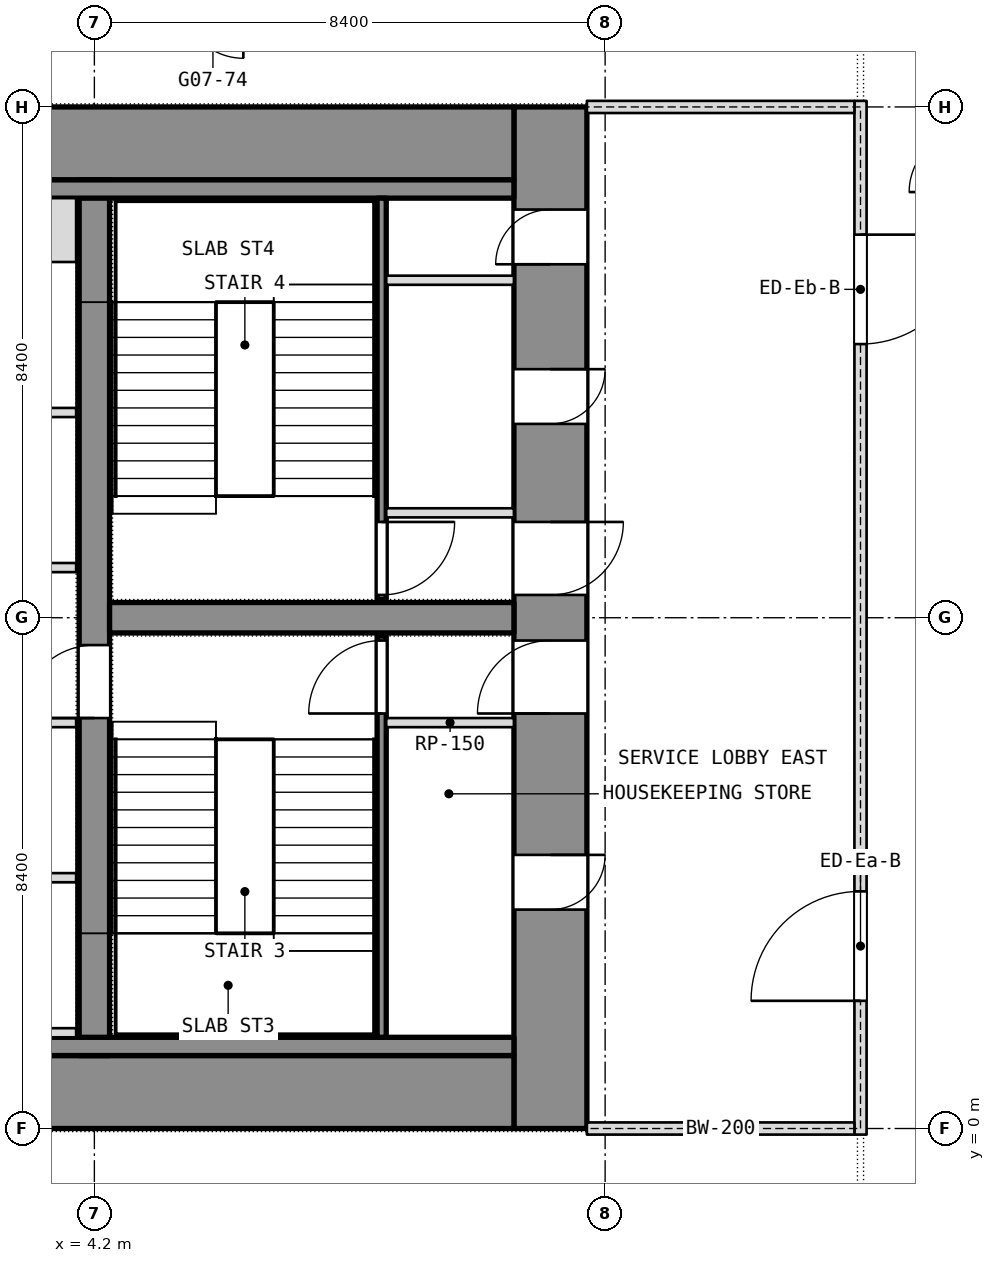
"""IFC4 building model, lengths in metres.
Left out: names, types, materials, properties, quantities, classifications, styles, units other than length and angle.
Written with IfcOpenShell. Run it as: python <this file> out.ifc"""

import sys

from ifc_helpers import new_model, si_unit, direction, frame, frame_2d, origin, place, context, subcontext, project, spatial, rectangle, extrude, element, fill, save


model = new_model("IFC4")
c1 = context("Model", 3, precision=1e-05, world=origin(), true_north=direction((0.0, 1.0)))
c2 = subcontext(c1, "Body", "Model", "MODEL_VIEW")
j1 = project(units=[si_unit("LENGTHUNIT", "METRE"), si_unit("PLANEANGLEUNIT", "RADIAN")], contexts=[c1])
p1 = place(None, origin())
s1 = spatial("IfcSite", under=j1, at=p1, CompositionType="ELEMENT")
p2 = place(p1, origin())
s2 = spatial("IfcBuilding", under=s1, at=p2, CompositionType="ELEMENT")
p3 = place(p2, frame((0.0, 0.0, 79.7)))
s3 = spatial("IfcBuildingStorey", under=s2, at=p3, CompositionType="ELEMENT", Elevation=79.7)
p4 = place(p3, frame((11.7, 0.0, 0.0), z_axis=(0.0, 0.0, 1.0), x_axis=(0.0, 1.0, 0.0)))
e1 = element("IfcWall", 1, at=p4, inside=s3, PredefinedType="SHEAR", context=c2, shape_type="SweptSolid", body=[
    extrude(rectangle(XDim=16.8, YDim=1.2, at=frame_2d((8.4, 0.0))), origin(), (0.0, 0.0, 1.0), 3.6),
])
p5 = place(p4, frame((3.6, 0.0, 0.0)))
e2 = element("IfcOpeningElement", 2, at=p5, cuts=e1, PredefinedType="OPENING", context=c2, shape_type="SweptSolid", body=[
    extrude(rectangle(XDim=0.9, YDim=2.1, at=frame_2d((0.45, 1.05))), frame((0.0, 0.6, 0.0), z_axis=(0.0, -1.0, 0.0), x_axis=(1.0, 0.0, 0.0)), (0.0, 0.0, 1.0), 1.2),
])
p6 = place(p4, frame((6.825, 0.0, 0.0)))
e3 = element("IfcOpeningElement", 3, at=p6, cuts=e1, PredefinedType="OPENING", context=c2, shape_type="SweptSolid", body=[
    extrude(rectangle(XDim=1.2, YDim=2.1, at=frame_2d((0.6, 1.05))), frame((0.0, 0.6, 0.0), z_axis=(0.0, -1.0, 0.0), x_axis=(1.0, 0.0, 0.0)), (0.0, 0.0, 1.0), 1.2),
])
p7 = place(p4, frame((14.212, 0.0, 0.0)))
e4 = element("IfcOpeningElement", 4, at=p7, cuts=e1, PredefinedType="OPENING", context=c2, shape_type="SweptSolid", body=[
    extrude(rectangle(XDim=0.9, YDim=2.1, at=frame_2d((0.45, 1.05))), frame((0.0, 0.6, 0.0), z_axis=(0.0, -1.0, 0.0), x_axis=(1.0, 0.0, 0.0)), (0.0, 0.0, 1.0), 1.2),
])
p8 = place(p4, frame((11.587, 0.0, 0.0)))
e5 = element("IfcOpeningElement", 5, at=p8, cuts=e1, PredefinedType="OPENING", context=c2, shape_type="SweptSolid", body=[
    extrude(rectangle(XDim=0.9, YDim=2.1, at=frame_2d((0.45, 1.05))), frame((0.0, 0.6, 0.0), z_axis=(0.0, -1.0, 0.0), x_axis=(1.0, 0.0, 0.0)), (0.0, 0.0, 1.0), 1.2),
])
p9 = place(p4, frame((8.775, 0.0, 0.0)))
e6 = element("IfcOpeningElement", 6, at=p9, cuts=e1, PredefinedType="OPENING", context=c2, shape_type="SweptSolid", body=[
    extrude(rectangle(XDim=1.2, YDim=2.1, at=frame_2d((0.6, 1.05))), frame((0.0, 0.6, 0.0), z_axis=(0.0, -1.0, 0.0), x_axis=(1.0, 0.0, 0.0)), (0.0, 0.0, 1.0), 1.2),
])
for number, where, z_axis, x_axis in (
    (7, (-11.1, 0.6, 0.0), (0.0, 0.0, 1.0), (1.0, 0.0, 0.0)),
    (8, (-11.1, 16.2, 0.0), (0.0, 0.0, 1.0), (1.0, 0.0, 0.0)),
):
    element("IfcWall", number, at=place(p3, frame(where, z_axis=z_axis, x_axis=x_axis)), inside=s3, PredefinedType="SHEAR", context=c2, shape_type="SweptSolid", body=[
        extrude(rectangle(XDim=22.2, YDim=1.2, at=frame_2d((11.1, 0.0))), origin(), (0.0, 0.0, 1.0), 3.6),
    ])
p10 = place(p3, frame((4.2, 1.2, 0.0), z_axis=(0.0, 0.0, 1.0), x_axis=(0.0, 1.0, 0.0)))
e9 = element("IfcWall", 9, at=p10, inside=s3, PredefinedType="SHEAR", context=c2, shape_type="SweptSolid", body=[
    extrude(rectangle(XDim=14.4, YDim=0.5, at=frame_2d((7.2, 0.0))), origin(), (0.0, 0.0, 1.0), 3.6),
])
p11 = place(p10, frame((5.55, 0.0, 0.0)))
e10 = element("IfcOpeningElement", 10, at=p11, cuts=e9, PredefinedType="OPENING", context=c2, shape_type="SweptSolid", body=[
    extrude(rectangle(XDim=1.2, YDim=2.1, at=frame_2d((0.6, 1.05))), frame((0.0, 0.25, 0.0), z_axis=(0.0, -1.0, 0.0), x_axis=(1.0, 0.0, 0.0)), (0.0, 0.0, 1.0), 0.5),
])
p12 = place(p3, frame((4.45, 8.4, 0.0), z_axis=(0.0, 0.0, 1.0), x_axis=(1.0, 0.0, 0.0)))
e11 = element("IfcWall", 11, at=p12, inside=s3, PredefinedType="SHEAR", context=c2, shape_type="SweptSolid", body=[
    extrude(rectangle(XDim=6.65, YDim=0.5, at=frame_2d((3.325, 0.0))), origin(), (0.0, 0.0, 1.0), 3.6),
])
for number, where, z_axis, x_axis in (
    (12, (-11.1, 1.35, 0.0), (0.0, 0.0, 1.0), (1.0, 0.0, 0.0)),
    (13, (-11.1, 15.45, 0.0), (0.0, 0.0, 1.0), (1.0, 0.0, 0.0)),
):
    element("IfcWall", number, at=place(p3, frame(where, z_axis=z_axis, x_axis=x_axis)), inside=s3, PredefinedType="PARTITIONING", context=c2, shape_type="SweptSolid", body=[
        extrude(rectangle(XDim=22.2, YDim=0.3, at=frame_2d((11.1, 0.0))), origin(), (0.0, 0.0, 1.0), 3.34),
    ])
p13 = place(p3, frame((8.925, 1.5, 0.0), z_axis=(0.0, 0.0, 1.0), x_axis=(0.0, 1.0, 0.0)))
e14 = element("IfcWall", 14, at=p13, inside=s3, PredefinedType="SHEAR", context=c2, shape_type="SweptSolid", body=[
    extrude(rectangle(XDim=6.6, YDim=0.15, at=frame_2d((3.3, 0.0))), origin(), (0.0, 0.0, 1.0), 3.34),
])
p14 = place(p13, frame((5.325, 0.0, 0.0)))
e15 = element("IfcOpeningElement", 15, at=p14, cuts=e14, PredefinedType="OPENING", context=c2, shape_type="SweptSolid", body=[
    extrude(rectangle(XDim=1.2, YDim=2.1, at=frame_2d((0.6, 1.05))), frame((0.0, 0.075, 0.0), z_axis=(0.0, -1.0, 0.0), x_axis=(1.0, 0.0, 0.0)), (0.0, 0.0, 1.0), 0.15),
])
p15 = place(p3, frame((9.0, 6.675, 0.0), z_axis=(0.0, 0.0, 1.0), x_axis=(1.0, 0.0, 0.0)))
e16 = element("IfcWall", 16, at=p15, inside=s3, PredefinedType="PARTITIONING", context=c2, shape_type="SweptSolid", body=[
    extrude(rectangle(XDim=2.1, YDim=0.15, at=frame_2d((1.05, 0.0))), origin(), (0.0, 0.0, 1.0), 3.34),
])
p16 = place(p3, frame((8.925, 8.7, 0.0), z_axis=(0.0, 0.0, 1.0), x_axis=(0.0, 1.0, 0.0)))
e17 = element("IfcWall", 17, at=p16, inside=s3, PredefinedType="SHEAR", context=c2, shape_type="SweptSolid", body=[
    extrude(rectangle(XDim=6.6, YDim=0.15, at=frame_2d((3.3, 0.0))), origin(), (0.0, 0.0, 1.0), 3.34),
])
p17 = place(p16, frame((0.075, 0.0, 0.0)))
e18 = element("IfcOpeningElement", 18, at=p17, cuts=e17, PredefinedType="OPENING", context=c2, shape_type="SweptSolid", body=[
    extrude(rectangle(XDim=1.2, YDim=2.1, at=frame_2d((0.6, 1.05))), frame((0.0, 0.075, 0.0), z_axis=(0.0, -1.0, 0.0), x_axis=(1.0, 0.0, 0.0)), (0.0, 0.0, 1.0), 0.15),
])
for number, where, z_axis, x_axis in (
    (19, (9.0, 10.125, 0.0), (0.0, 0.0, 1.0), (1.0, 0.0, 0.0)),
    (20, (9.0, 13.95, 0.0), (0.0, 0.0, 1.0), (1.0, 0.0, 0.0)),
):
    element("IfcWall", number, at=place(p3, frame(where, z_axis=z_axis, x_axis=x_axis)), inside=s3, PredefinedType="PARTITIONING", context=c2, shape_type="SweptSolid", body=[
        extrude(rectangle(XDim=2.1, YDim=0.15, at=frame_2d((1.05, 0.0))), origin(), (0.0, 0.0, 1.0), 3.34),
    ])
p18 = place(p3, frame((-3.9, 4.125, 0.0), z_axis=(0.0, 0.0, 1.0), x_axis=(1.0, 0.0, 0.0)))
e21 = element("IfcWall", 21, at=p18, inside=s3, PredefinedType="PARTITIONING", context=c2, shape_type="SweptSolid", body=[
    extrude(rectangle(XDim=7.8, YDim=0.15, at=frame_2d((3.9, 0.0))), origin(), (0.0, 0.0, 1.0), 3.34),
])
p19 = place(p18, frame((3.75, 0.0, 0.0)))
e22 = element("IfcOpeningElement", 22, at=p19, cuts=e21, PredefinedType="OPENING", context=c2, shape_type="SweptSolid", body=[
    extrude(rectangle(XDim=1.2, YDim=2.1, at=frame_2d((0.6, 1.05))), frame((0.0, 0.075, 0.0), z_axis=(0.0, -1.0, 0.0), x_axis=(1.0, 0.0, 0.0)), (0.0, 0.0, 1.0), 0.15),
])
p20 = place(p3, frame((-3.9, 11.775, 0.0), z_axis=(0.0, 0.0, 1.0), x_axis=(1.0, 0.0, 0.0)))
e23 = element("IfcWall", 23, at=p20, inside=s3, PredefinedType="PARTITIONING", context=c2, shape_type="SweptSolid", body=[
    extrude(rectangle(XDim=7.8, YDim=0.15, at=frame_2d((3.9, 0.0))), origin(), (0.0, 0.0, 1.0), 3.34),
])
p21 = place(p20, frame((3.3, 0.0, 0.0)))
e24 = element("IfcOpeningElement", 24, at=p21, cuts=e23, PredefinedType="OPENING", context=c2, shape_type="SweptSolid", body=[
    extrude(rectangle(XDim=1.2, YDim=2.1, at=frame_2d((0.6, 1.05))), frame((0.0, 0.075, 0.0), z_axis=(0.0, -1.0, 0.0), x_axis=(1.0, 0.0, 0.0)), (0.0, 0.0, 1.0), 0.15),
])
p22 = place(p3, frame((1.65, 1.575, 0.0), z_axis=(0.0, 0.0, 1.0), x_axis=(1.0, 0.0, 0.0)))
e25 = element("IfcWall", 25, at=p22, inside=s3, PredefinedType="SHEAR", context=c2, shape_type="SweptSolid", body=[
    extrude(rectangle(XDim=2.25, YDim=0.15, at=frame_2d((1.125, 0.0))), origin(), (0.0, 0.0, 1.0), 3.6),
])
p23 = place(p3, frame((1.65, 14.775, 0.0), z_axis=(0.0, 0.0, 1.0), x_axis=(1.0, 0.0, 0.0)))
e26 = element("IfcWall", 26, at=p23, inside=s3, PredefinedType="SHEAR", context=c2, shape_type="SweptSolid", body=[
    extrude(rectangle(XDim=2.25, YDim=1.05, at=frame_2d((1.125, 0.0))), origin(), (0.0, 0.0, 1.0), 3.6),
])
for number, where, z_axis, x_axis in (
    (27, (1.65, 6.675, 0.0), (0.0, 0.0, 1.0), (1.0, 0.0, 0.0)),
    (28, (1.65, 9.225, 0.0), (0.0, 0.0, 1.0), (1.0, 0.0, 0.0)),
):
    element("IfcWall", number, at=place(p3, frame(where, z_axis=z_axis, x_axis=x_axis)), inside=s3, PredefinedType="SHEAR", context=c2, shape_type="SweptSolid", body=[
        extrude(rectangle(XDim=2.25, YDim=0.15, at=frame_2d((1.125, 0.0))), origin(), (0.0, 0.0, 1.0), 3.6),
    ])
p24 = place(p3, frame((16.8, -0.1, 0.0), z_axis=(0.0, 0.0, 1.0), x_axis=(0.0, 1.0, 0.0)))
e29 = element("IfcWall", 29, at=p24, inside=s3, PredefinedType="PARTITIONING", context=c2, shape_type="SweptSolid", body=[
    extrude(rectangle(XDim=17.0, YDim=0.2, at=frame_2d((8.5, 0.0))), origin(), (0.0, 0.0, 1.0), 3.34),
])
p25 = place(p24, frame((2.2, 0.0, 0.0)))
e30 = element("IfcOpeningElement", 30, at=p25, cuts=e29, PredefinedType="OPENING", context=c2, shape_type="SweptSolid", body=[
    extrude(rectangle(XDim=1.8, YDim=2.1, at=frame_2d((0.9, 1.05))), frame((0.0, 0.1, 0.0), z_axis=(0.0, -1.0, 0.0), x_axis=(1.0, 0.0, 0.0)), (0.0, 0.0, 1.0), 0.2),
])
p26 = place(p24, frame((13.0, 0.0, 0.0)))
e31 = element("IfcOpeningElement", 31, at=p26, cuts=e29, PredefinedType="OPENING", context=c2, shape_type="SweptSolid", body=[
    extrude(rectangle(XDim=1.8, YDim=2.1, at=frame_2d((0.9, 1.05))), frame((0.0, 0.1, 0.0), z_axis=(0.0, -1.0, 0.0), x_axis=(1.0, 0.0, 0.0)), (0.0, 0.0, 1.0), 0.2),
])
for number, where, z_axis, x_axis in (
    (32, (12.3, 0.0, 0.0), (0.0, 0.0, 1.0), (1.0, 0.0, 0.0)),
    (33, (12.3, 16.8, 0.0), (0.0, 0.0, 1.0), (1.0, 0.0, 0.0)),
):
    element("IfcWall", number, at=place(p3, frame(where, z_axis=z_axis, x_axis=x_axis)), inside=s3, PredefinedType="PARTITIONING", context=c2, shape_type="SweptSolid", body=[
        extrude(rectangle(XDim=4.4, YDim=0.2, at=frame_2d((2.2, 0.0))), origin(), (0.0, 0.0, 1.0), 2.84),
    ])
p27 = place(p5, origin())
e34 = element("IfcDoor", 34, at=p27, inside=s3, OperationType="SINGLE_SWING_LEFT", PredefinedType="DOOR", context=c2, shape_type="SweptSolid", body=[
    extrude(rectangle(XDim=0.9, YDim=2.1, at=frame_2d((0.45, 1.05))), frame((0.0, 0.025, 0.0), z_axis=(0.0, -1.0, 0.0), x_axis=(1.0, 0.0, 0.0)), (0.0, 0.0, 1.0), 0.05),
])
fill(e2, e34)
p28 = place(p6, origin())
e35 = element("IfcDoor", 35, at=p28, inside=s3, OperationType="SINGLE_SWING_LEFT", PredefinedType="DOOR", context=c2, shape_type="SweptSolid", body=[
    extrude(rectangle(XDim=1.2, YDim=2.1, at=frame_2d((0.6, 1.05))), frame((0.0, 0.025, 0.0), z_axis=(0.0, -1.0, 0.0), x_axis=(1.0, 0.0, 0.0)), (0.0, 0.0, 1.0), 0.05),
])
fill(e3, e35)
p29 = place(p14, origin())
e36 = element("IfcDoor", 36, at=p29, inside=s3, OperationType="SINGLE_SWING_LEFT", PredefinedType="DOOR", context=c2, shape_type="SweptSolid", body=[
    extrude(rectangle(XDim=1.2, YDim=2.1, at=frame_2d((0.6, 1.05))), frame((0.0, 0.025, 0.0), z_axis=(0.0, -1.0, 0.0), x_axis=(1.0, 0.0, 0.0)), (0.0, 0.0, 1.0), 0.05),
])
fill(e15, e36)
p30 = place(p7, origin())
e37 = element("IfcDoor", 37, at=p30, inside=s3, OperationType="SINGLE_SWING_LEFT", PredefinedType="DOOR", context=c2, shape_type="SweptSolid", body=[
    extrude(rectangle(XDim=0.9, YDim=2.1, at=frame_2d((0.45, 1.05))), frame((0.0, 0.025, 0.0), z_axis=(0.0, -1.0, 0.0), x_axis=(1.0, 0.0, 0.0)), (0.0, 0.0, 1.0), 0.05),
])
fill(e4, e37)
p31 = place(p8, origin())
e38 = element("IfcDoor", 38, at=p31, inside=s3, OperationType="SINGLE_SWING_LEFT", PredefinedType="DOOR", context=c2, shape_type="SweptSolid", body=[
    extrude(rectangle(XDim=0.9, YDim=2.1, at=frame_2d((0.45, 1.05))), frame((0.0, 0.025, 0.0), z_axis=(0.0, -1.0, 0.0), x_axis=(1.0, 0.0, 0.0)), (0.0, 0.0, 1.0), 0.05),
])
fill(e5, e38)
p32 = place(p9, origin())
e39 = element("IfcDoor", 39, at=p32, inside=s3, OperationType="SINGLE_SWING_LEFT", PredefinedType="DOOR", context=c2, shape_type="SweptSolid", body=[
    extrude(rectangle(XDim=1.2, YDim=2.1, at=frame_2d((0.6, 1.05))), frame((0.0, 0.025, 0.0), z_axis=(0.0, -1.0, 0.0), x_axis=(1.0, 0.0, 0.0)), (0.0, 0.0, 1.0), 0.05),
])
fill(e6, e39)
p33 = place(p17, origin())
e40 = element("IfcDoor", 40, at=p33, inside=s3, OperationType="SINGLE_SWING_LEFT", PredefinedType="DOOR", context=c2, shape_type="SweptSolid", body=[
    extrude(rectangle(XDim=1.2, YDim=2.1, at=frame_2d((0.6, 1.05))), frame((0.0, 0.025, 0.0), z_axis=(0.0, -1.0, 0.0), x_axis=(1.0, 0.0, 0.0)), (0.0, 0.0, 1.0), 0.05),
])
fill(e18, e40)
p34 = place(p11, origin())
e41 = element("IfcDoor", 41, at=p34, inside=s3, OperationType="SINGLE_SWING_LEFT", PredefinedType="DOOR", context=c2, shape_type="SweptSolid", body=[
    extrude(rectangle(XDim=1.2, YDim=2.1, at=frame_2d((0.6, 1.05))), frame((0.0, 0.025, 0.0), z_axis=(0.0, -1.0, 0.0), x_axis=(1.0, 0.0, 0.0)), (0.0, 0.0, 1.0), 0.05),
])
fill(e10, e41)
p35 = place(p25, origin())
e42 = element("IfcDoor", 42, at=p35, inside=s3, OperationType="DOUBLE_DOOR_SINGLE_SWING", PredefinedType="DOOR", context=c2, shape_type="SweptSolid", body=[
    extrude(rectangle(XDim=1.8, YDim=2.1, at=frame_2d((0.9, 1.05))), frame((0.0, 0.025, 0.0), z_axis=(0.0, -1.0, 0.0), x_axis=(1.0, 0.0, 0.0)), (0.0, 0.0, 1.0), 0.05),
])
fill(e30, e42)
p36 = place(p26, origin())
e43 = element("IfcDoor", 43, at=p36, inside=s3, OperationType="DOUBLE_DOOR_SINGLE_SWING", PredefinedType="DOOR", context=c2, shape_type="SweptSolid", body=[
    extrude(rectangle(XDim=1.8, YDim=2.1, at=frame_2d((0.9, 1.05))), frame((0.0, 0.025, 0.0), z_axis=(0.0, -1.0, 0.0), x_axis=(1.0, 0.0, 0.0)), (0.0, 0.0, 1.0), 0.05),
])
fill(e31, e43)
save(model, sys.argv[1])
